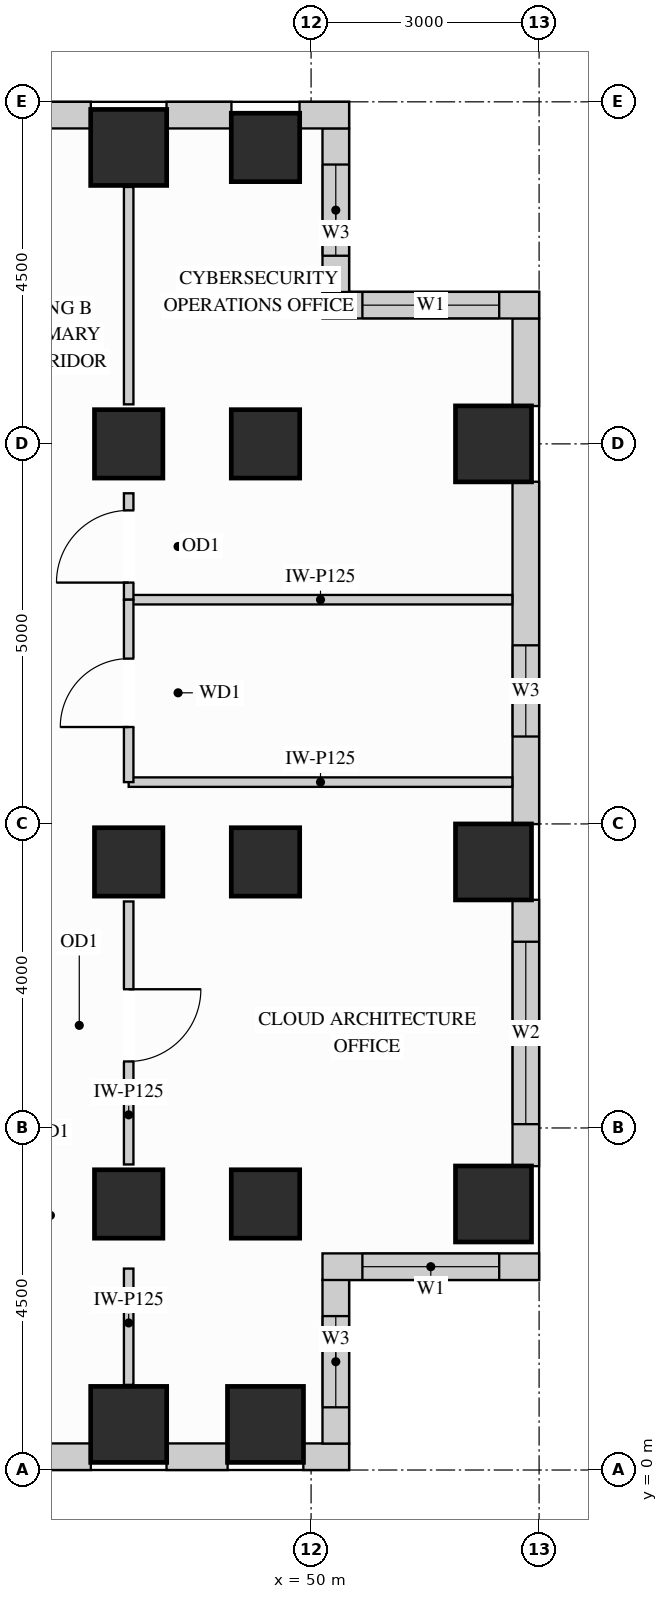
"""IFC4 building model, lengths in metres.
Left out: names, types, materials, properties, quantities, classifications, styles, units other than length and angle.
Written with IfcOpenShell. Run it as: python <this file> out.ifc"""

import sys

from ifc_helpers import new_model, si_unit, direction, frame, frame_2d, origin, origin_2d, place, context, subcontext, project, spatial, rectangle, extrude, source, transform, mapped, element, fill, save


model = new_model("IFC4")
c1 = context("Model", 3, precision=1e-05, world=origin(), true_north=direction((0.0, 1.0)))
c2 = subcontext(c1, "Body", "Model", "MODEL_VIEW")
j1 = project(units=[si_unit("LENGTHUNIT", "METRE"), si_unit("PLANEANGLEUNIT", "RADIAN")], contexts=[c1])
p1 = place(None, origin())
s1 = spatial("IfcSite", under=j1, at=p1, CompositionType="ELEMENT")
p2 = place(p1, origin())
s2 = spatial("IfcBuilding", under=s1, at=p2, CompositionType="ELEMENT")
p3 = place(p2, frame((0.0, 0.0, 193.5)))
s3 = spatial("IfcBuildingStorey", under=s2, at=p3, CompositionType="ELEMENT", Elevation=193.5)
m1 = source(origin(), c2, "Body", "SweptSolid", [
    extrude(rectangle(XDim=0.9, YDim=0.9, at=origin_2d()), origin(), (0.0, 0.0, 1.0), 3.4),
])
for number, where, z_axis, x_axis in (
    (1, (47.6, 13.5, 0.0), (0.0, 0.0, 1.0), (1.0, 0.0, 0.0)),
    (2, (47.6, 3.5, 0.0), (0.0, 0.0, 1.0), (1.0, 0.0, 0.0)),
    (3, (47.6, 8.0, 0.0), (0.0, 0.0, 1.0), (1.0, 0.0, 0.0)),
    (4, (49.4, 13.5, 0.0), (0.0, 0.0, 1.0), (1.0, 0.0, 0.0)),
    (5, (49.4, 17.4, 0.0), (0.0, 0.0, 1.0), (1.0, 0.0, 0.0)),
    (6, (49.4, 3.5, 0.0), (0.0, 0.0, 1.0), (1.0, 0.0, 0.0)),
    (7, (49.4, 8.0, 0.0), (0.0, 0.0, 1.0), (1.0, 0.0, 0.0)),
):
    element("IfcColumn", number, at=place(p3, frame(where, z_axis=z_axis, x_axis=x_axis)), inside=s3, PredefinedType="COLUMN", context=c2, shape_type="MappedRepresentation", body=[
        mapped(m1, transform((0.0, 0.0, 0.0), x_axis=(1.0, 0.0, 0.0), y_axis=(0.0, 1.0, 0.0), z_axis=(0.0, 0.0, 1.0))),
    ])
m2 = source(origin(), c2, "Body", "SweptSolid", [
    extrude(rectangle(XDim=1.0, YDim=1.0, at=origin_2d()), origin(), (0.0, 0.0, 1.0), 3.4),
])
for number, where, z_axis, x_axis in (
    (8, (47.6, 17.4, 0.0), (0.0, 0.0, 1.0), (1.0, 0.0, 0.0)),
    (9, (52.4, 13.5, 0.0), (0.0, 0.0, 1.0), (1.0, 0.0, 0.0)),
    (10, (52.4, 3.5, 0.0), (0.0, 0.0, 1.0), (1.0, 0.0, 0.0)),
    (11, (52.4, 8.0, 0.0), (0.0, 0.0, 1.0), (1.0, 0.0, 0.0)),
    (12, (47.6, 0.6, 0.0), (0.0, 0.0, 1.0), (1.0, 0.0, 0.0)),
    (13, (49.4, 0.6, 0.0), (0.0, 0.0, 1.0), (1.0, 0.0, 0.0)),
):
    element("IfcColumn", number, at=place(p3, frame(where, z_axis=z_axis, x_axis=x_axis)), inside=s3, PredefinedType="COLUMN", context=c2, shape_type="MappedRepresentation", body=[
        mapped(m2, transform((0.0, 0.0, 0.0), x_axis=(1.0, 0.0, 0.0), y_axis=(0.0, 1.0, 0.0), z_axis=(0.0, 0.0, 1.0))),
    ])
p4 = place(p3, frame((40.498, 0.175, 0.0), z_axis=(0.0, 0.0, 1.0), x_axis=(1.0, 0.0, 0.0)))
e14 = element("IfcWall", 14, at=p4, inside=s3, PredefinedType="SOLIDWALL", context=c2, shape_type="SweptSolid", body=[
    extrude(rectangle(XDim=6.604, YDim=0.35, at=frame_2d((3.302, 0.0))), origin(), (0.0, 0.0, 1.0), 2.612),
])
p5 = place(p4, frame((0.737, 0.0, 0.78)))
e15 = element("IfcOpeningElement", 15, at=p5, cuts=e14, PredefinedType="OPENING", context=c2, shape_type="SweptSolid", body=[
    extrude(rectangle(XDim=1.8, YDim=1.652, at=frame_2d((0.9, 0.826))), frame((0.0, 0.185, 0.0), z_axis=(0.0, -1.0, 0.0), x_axis=(1.0, 0.0, 0.0)), (0.0, 0.0, 1.0), 0.37),
])
p6 = place(p4, frame((2.955, 0.0, 0.78)))
e16 = element("IfcOpeningElement", 16, at=p6, cuts=e14, PredefinedType="OPENING", context=c2, shape_type="SweptSolid", body=[
    extrude(rectangle(XDim=1.8, YDim=1.652, at=frame_2d((0.9, 0.826))), frame((0.0, 0.185, 0.0), z_axis=(0.0, -1.0, 0.0), x_axis=(1.0, 0.0, 0.0)), (0.0, 0.0, 1.0), 0.37),
])
m3 = source(origin(), c2, "Body", "SweptSolid", [
    extrude(rectangle(XDim=0.804, YDim=0.35, at=frame_2d((0.402, 0.0))), origin(), (0.0, 0.0, 1.0), 3.385),
])
p7 = place(p3, frame((48.098, 0.175, 0.0), z_axis=(0.0, 0.0, 1.0), x_axis=(1.0, 0.0, 0.0)))
e17 = element("IfcWall", 17, at=p7, inside=s3, PredefinedType="SOLIDWALL", context=c2, shape_type="MappedRepresentation", body=[
    mapped(m3, transform((0.0, 0.0, 0.0), x_axis=(1.0, 0.0, 0.0), y_axis=(0.0, 1.0, 0.0), z_axis=(0.0, 0.0, 1.0))),
])
m4 = source(origin(), c2, "Body", "SweptSolid", [
    extrude(rectangle(XDim=0.602, YDim=0.35, at=frame_2d((0.301, 0.0))), origin(), (0.0, 0.0, 1.0), 3.385),
])
p8 = place(p3, frame((49.898, 0.175, 0.0), z_axis=(0.0, 0.0, 1.0), x_axis=(1.0, 0.0, 0.0)))
e18 = element("IfcWall", 18, at=p8, inside=s3, PredefinedType="SOLIDWALL", context=c2, shape_type="MappedRepresentation", body=[
    mapped(m4, transform((0.0, 0.0, 0.0), x_axis=(1.0, 0.0, 0.0), y_axis=(0.0, 1.0, 0.0), z_axis=(0.0, 0.0, 1.0))),
])
p9 = place(p3, frame((50.325, 0.348, 0.0), z_axis=(0.0, 0.0, 1.0), x_axis=(0.0, 1.0, 0.0)))
e19 = element("IfcWall", 19, at=p9, inside=s3, PredefinedType="SOLIDWALL", context=c2, shape_type="SweptSolid", body=[
    extrude(rectangle(XDim=2.154, YDim=0.35, at=frame_2d((1.077, 0.0))), origin(), (0.0, 0.0, 1.0), 3.385),
])
p10 = place(p9, frame((0.477, 0.0, 0.78)))
e20 = element("IfcOpeningElement", 20, at=p10, cuts=e19, PredefinedType="OPENING", context=c2, shape_type="SweptSolid", body=[
    extrude(rectangle(XDim=1.2, YDim=2.1, at=frame_2d((0.6, 1.05))), frame((0.0, 0.185, 0.0), z_axis=(0.0, -1.0, 0.0), x_axis=(1.0, 0.0, 0.0)), (0.0, 0.0, 1.0), 0.37),
])
p11 = place(p3, frame((50.15, 2.675, 0.0), z_axis=(0.0, 0.0, 1.0), x_axis=(1.0, 0.0, 0.0)))
e21 = element("IfcWall", 21, at=p11, inside=s3, PredefinedType="SOLIDWALL", context=c2, shape_type="SweptSolid", body=[
    extrude(rectangle(XDim=2.85, YDim=0.35, at=frame_2d((1.425, 0.0))), origin(), (0.0, 0.0, 1.0), 3.385),
])
p12 = place(p11, frame((0.525, 0.0, 0.78)))
e22 = element("IfcOpeningElement", 22, at=p12, cuts=e21, PredefinedType="OPENING", context=c2, shape_type="SweptSolid", body=[
    extrude(rectangle(XDim=1.8, YDim=2.1, at=frame_2d((0.9, 1.05))), frame((0.0, 0.185, 0.0), z_axis=(0.0, -1.0, 0.0), x_axis=(1.0, 0.0, 0.0)), (0.0, 0.0, 1.0), 0.37),
])
p13 = place(p3, frame((52.825, 3.998, 0.0), z_axis=(0.0, 0.0, 1.0), x_axis=(0.0, 1.0, 0.0)))
e23 = element("IfcWall", 23, at=p13, inside=s3, PredefinedType="SOLIDWALL", context=c2, shape_type="SweptSolid", body=[
    extrude(rectangle(XDim=3.504, YDim=0.35, at=frame_2d((1.752, 0.0))), origin(), (0.0, 0.0, 1.0), 2.612),
])
p14 = place(p13, frame((0.552, 0.0, 0.78)))
e24 = element("IfcOpeningElement", 24, at=p14, cuts=e23, PredefinedType="OPENING", context=c2, shape_type="SweptSolid", body=[
    extrude(rectangle(XDim=2.4, YDim=1.652, at=frame_2d((1.2, 0.826))), frame((0.0, 0.185, 0.0), z_axis=(0.0, -1.0, 0.0), x_axis=(1.0, 0.0, 0.0)), (0.0, 0.0, 1.0), 0.37),
])
p15 = place(p3, frame((52.825, 8.498, 0.0), z_axis=(0.0, 0.0, 1.0), x_axis=(0.0, 1.0, 0.0)))
e25 = element("IfcWall", 25, at=p15, inside=s3, PredefinedType="SOLIDWALL", context=c2, shape_type="SweptSolid", body=[
    extrude(rectangle(XDim=4.504, YDim=0.35, at=frame_2d((2.252, 0.0))), origin(), (0.0, 0.0, 1.0), 2.612),
])
p16 = place(p15, frame((1.152, 0.0, 0.78)))
e26 = element("IfcOpeningElement", 26, at=p16, cuts=e25, PredefinedType="OPENING", context=c2, shape_type="SweptSolid", body=[
    extrude(rectangle(XDim=1.2, YDim=1.652, at=frame_2d((0.6, 0.826))), frame((0.0, 0.185, 0.0), z_axis=(0.0, -1.0, 0.0), x_axis=(1.0, 0.0, 0.0)), (0.0, 0.0, 1.0), 0.37),
])
m5 = source(origin(), c2, "Body", "SweptSolid", [
    extrude(rectangle(XDim=1.154, YDim=0.35, at=frame_2d((0.577, 0.0))), origin(), (0.0, 0.0, 1.0), 3.385),
])
p17 = place(p3, frame((52.825, 13.998, 0.0), z_axis=(0.0, 0.0, 1.0), x_axis=(0.0, 1.0, 0.0)))
e27 = element("IfcWall", 27, at=p17, inside=s3, PredefinedType="SOLIDWALL", context=c2, shape_type="MappedRepresentation", body=[
    mapped(m5, transform((0.0, 0.0, 0.0), x_axis=(1.0, 0.0, 0.0), y_axis=(0.0, 1.0, 0.0), z_axis=(0.0, 0.0, 1.0))),
])
p18 = place(p3, frame((53.0, 15.325, 0.0), z_axis=(0.0, 0.0, 1.0), x_axis=(-1.0, 0.0, 0.0)))
e28 = element("IfcWall", 28, at=p18, inside=s3, PredefinedType="SOLIDWALL", context=c2, shape_type="SweptSolid", body=[
    extrude(rectangle(XDim=2.85, YDim=0.35, at=frame_2d((1.425, 0.0))), origin(), (0.0, 0.0, 1.0), 3.385),
])
p19 = place(p18, frame((0.525, 0.0, 0.78)))
e29 = element("IfcOpeningElement", 29, at=p19, cuts=e28, PredefinedType="OPENING", context=c2, shape_type="SweptSolid", body=[
    extrude(rectangle(XDim=1.8, YDim=2.1, at=frame_2d((0.9, 1.05))), frame((0.0, 0.185, 0.0), z_axis=(0.0, -1.0, 0.0), x_axis=(1.0, 0.0, 0.0)), (0.0, 0.0, 1.0), 0.37),
])
p20 = place(p3, frame((50.325, 15.498, 0.0), z_axis=(0.0, 0.0, 1.0), x_axis=(0.0, 1.0, 0.0)))
e30 = element("IfcWall", 30, at=p20, inside=s3, PredefinedType="SOLIDWALL", context=c2, shape_type="SweptSolid", body=[
    extrude(rectangle(XDim=2.154, YDim=0.35, at=frame_2d((1.077, 0.0))), origin(), (0.0, 0.0, 1.0), 3.385),
])
p21 = place(p20, frame((0.477, 0.0, 0.78)))
e31 = element("IfcOpeningElement", 31, at=p21, cuts=e30, PredefinedType="OPENING", context=c2, shape_type="SweptSolid", body=[
    extrude(rectangle(XDim=1.2, YDim=2.1, at=frame_2d((0.6, 1.05))), frame((0.0, 0.185, 0.0), z_axis=(0.0, -1.0, 0.0), x_axis=(1.0, 0.0, 0.0)), (0.0, 0.0, 1.0), 0.37),
])
m6 = source(origin(), c2, "Body", "SweptSolid", [
    extrude(rectangle(XDim=0.652, YDim=0.35, at=frame_2d((0.326, 0.0))), origin(), (0.0, 0.0, 1.0), 3.385),
])
p22 = place(p3, frame((50.5, 17.825, 0.0), z_axis=(0.0, 0.0, 1.0), x_axis=(-1.0, 0.0, 0.0)))
e32 = element("IfcWall", 32, at=p22, inside=s3, PredefinedType="SOLIDWALL", context=c2, shape_type="MappedRepresentation", body=[
    mapped(m6, transform((0.0, 0.0, 0.0), x_axis=(1.0, 0.0, 0.0), y_axis=(0.0, 1.0, 0.0), z_axis=(0.0, 0.0, 1.0))),
])
m7 = source(origin(), c2, "Body", "SweptSolid", [
    extrude(rectangle(XDim=0.854, YDim=0.35, at=frame_2d((0.427, 0.0))), origin(), (0.0, 0.0, 1.0), 3.385),
])
p23 = place(p3, frame((48.952, 17.825, 0.0), z_axis=(0.0, 0.0, 1.0), x_axis=(-1.0, 0.0, 0.0)))
e33 = element("IfcWall", 33, at=p23, inside=s3, PredefinedType="SOLIDWALL", context=c2, shape_type="MappedRepresentation", body=[
    mapped(m7, transform((0.0, 0.0, 0.0), x_axis=(1.0, 0.0, 0.0), y_axis=(0.0, 1.0, 0.0), z_axis=(0.0, 0.0, 1.0))),
])
p24 = place(p3, frame((47.102, 17.825, 0.0), z_axis=(0.0, 0.0, 1.0), x_axis=(-1.0, 0.0, 0.0)))
e34 = element("IfcWall", 34, at=p24, inside=s3, PredefinedType="SOLIDWALL", context=c2, shape_type="SweptSolid", body=[
    extrude(rectangle(XDim=6.604, YDim=0.35, at=frame_2d((3.302, 0.0))), origin(), (0.0, 0.0, 1.0), 2.612),
])
p25 = place(p24, frame((1.849, 0.0, 0.78)))
e35 = element("IfcOpeningElement", 35, at=p25, cuts=e34, PredefinedType="OPENING", context=c2, shape_type="SweptSolid", body=[
    extrude(rectangle(XDim=1.8, YDim=1.652, at=frame_2d((0.9, 0.826))), frame((0.0, 0.185, 0.0), z_axis=(0.0, -1.0, 0.0), x_axis=(1.0, 0.0, 0.0)), (0.0, 0.0, 1.0), 0.37),
])
p26 = place(p24, frame((4.067, 0.0, 0.78)))
e36 = element("IfcOpeningElement", 36, at=p26, cuts=e34, PredefinedType="OPENING", context=c2, shape_type="SweptSolid", body=[
    extrude(rectangle(XDim=1.8, YDim=1.652, at=frame_2d((0.9, 0.826))), frame((0.0, 0.185, 0.0), z_axis=(0.0, -1.0, 0.0), x_axis=(1.0, 0.0, 0.0)), (0.0, 0.0, 1.0), 0.37),
])
m8 = source(origin(), c2, "Body", "SweptSolid", [
    extrude(rectangle(XDim=5.048, YDim=0.125, at=frame_2d((2.524, 0.0))), origin(), (0.0, 0.0, 1.0), 3.385),
])
for number, where, z_axis, x_axis in (
    (37, (47.6, 11.45, 0.0), (0.0, 0.0, 1.0), (1.0, 0.0, 0.0)),
    (38, (47.6, 9.05, 0.0), (0.0, 0.0, 1.0), (1.0, 0.0, 0.0)),
):
    element("IfcWall", number, at=place(p3, frame(where, z_axis=z_axis, x_axis=x_axis)), inside=s3, PredefinedType="PARTITIONING", context=c2, shape_type="MappedRepresentation", body=[
        mapped(m8, transform((0.0, 0.0, 0.0), x_axis=(1.0, 0.0, 0.0), y_axis=(0.0, 1.0, 0.0), z_axis=(0.0, 0.0, 1.0))),
    ])
p27 = place(p3, frame((47.6, 4.02, 0.0), z_axis=(0.0, 0.0, 1.0), x_axis=(0.0, 1.0, 0.0)))
e39 = element("IfcWall", 39, at=p27, inside=s3, PredefinedType="PARTITIONING", context=c2, shape_type="SweptSolid", body=[
    extrude(rectangle(XDim=3.46, YDim=0.125, at=frame_2d((1.73, 0.0))), origin(), (0.0, 0.0, 1.0), 2.773),
])
p28 = place(p27, frame((1.355, 0.0, 0.0)))
e40 = element("IfcOpeningElement", 40, at=p28, cuts=e39, PredefinedType="OPENING", context=c2, shape_type="SweptSolid", body=[
    extrude(rectangle(XDim=0.95, YDim=2.15, at=frame_2d((0.475, 1.075))), frame((0.0, 0.073, 0.0), z_axis=(0.0, -1.0, 0.0), x_axis=(1.0, 0.0, 0.0)), (0.0, 0.0, 1.0), 0.145),
])
m9 = source(origin(), c2, "Body", "SweptSolid", [
    extrude(rectangle(XDim=1.53, YDim=0.125, at=frame_2d((0.765, 0.0))), origin(), (0.0, 0.0, 1.0), 2.773),
])
p29 = place(p3, frame((47.6, 1.12, 0.0), z_axis=(0.0, 0.0, 1.0), x_axis=(0.0, 1.0, 0.0)))
e41 = element("IfcWall", 41, at=p29, inside=s3, PredefinedType="PARTITIONING", context=c2, shape_type="MappedRepresentation", body=[
    mapped(m9, transform((0.0, 0.0, 0.0), x_axis=(1.0, 0.0, 0.0), y_axis=(0.0, 1.0, 0.0), z_axis=(0.0, 0.0, 1.0))),
])
p30 = place(p3, frame((47.6, 11.45, 0.0), z_axis=(0.0, 0.0, 1.0), x_axis=(0.0, 1.0, 0.0)))
e42 = element("IfcWall", 42, at=p30, inside=s3, PredefinedType="PARTITIONING", context=c2, shape_type="SweptSolid", body=[
    extrude(rectangle(XDim=1.4, YDim=0.125, at=frame_2d((0.7, 0.0))), origin(), (0.0, 0.0, 1.0), 2.773),
])
p31 = place(p30, frame((0.225, 0.0, 0.0)))
e43 = element("IfcOpeningElement", 43, at=p31, cuts=e42, PredefinedType="OPENING", context=c2, shape_type="SweptSolid", body=[
    extrude(rectangle(XDim=0.95, YDim=2.15, at=frame_2d((0.475, 1.075))), frame((0.0, 0.073, 0.0), z_axis=(0.0, -1.0, 0.0), x_axis=(1.0, 0.0, 0.0)), (0.0, 0.0, 1.0), 0.145),
])
m10 = source(origin(), c2, "Body", "SweptSolid", [
    extrude(rectangle(XDim=2.86, YDim=0.125, at=frame_2d((1.43, 0.0))), origin(), (0.0, 0.0, 1.0), 2.773),
])
p32 = place(p3, frame((47.6, 14.02, 0.0), z_axis=(0.0, 0.0, 1.0), x_axis=(0.0, 1.0, 0.0)))
e44 = element("IfcWall", 44, at=p32, inside=s3, PredefinedType="PARTITIONING", context=c2, shape_type="MappedRepresentation", body=[
    mapped(m10, transform((0.0, 0.0, 0.0), x_axis=(1.0, 0.0, 0.0), y_axis=(0.0, 1.0, 0.0), z_axis=(0.0, 0.0, 1.0))),
])
p33 = place(p3, frame((47.6, 9.05, 0.0), z_axis=(0.0, 0.0, 1.0), x_axis=(0.0, 1.0, 0.0)))
e45 = element("IfcWall", 45, at=p33, inside=s3, PredefinedType="PARTITIONING", context=c2, shape_type="SweptSolid", body=[
    extrude(rectangle(XDim=2.4, YDim=0.125, at=frame_2d((1.2, 0.0))), origin(), (0.0, 0.0, 1.0), 2.773),
])
p34 = place(p33, frame((0.725, 0.0, 0.0)))
e46 = element("IfcOpeningElement", 46, at=p34, cuts=e45, PredefinedType="OPENING", context=c2, shape_type="SweptSolid", body=[
    extrude(rectangle(XDim=0.9, YDim=2.15, at=frame_2d((0.45, 1.075))), frame((0.0, 0.073, 0.0), z_axis=(0.0, -1.0, 0.0), x_axis=(1.0, 0.0, 0.0)), (0.0, 0.0, 1.0), 0.145),
])
m11 = source(origin(), c2, "Body", "SweptSolid", [
    extrude(rectangle(XDim=0.95, YDim=2.15, at=frame_2d((0.475, 1.075))), frame((0.0, 0.025, 0.0), z_axis=(0.0, -1.0, 0.0), x_axis=(1.0, 0.0, 0.0)), (0.0, 0.0, 1.0), 0.05),
])
p35 = place(p28, origin())
e47 = element("IfcDoor", 47, at=p35, inside=s3, OperationType="SINGLE_SWING_RIGHT", PredefinedType="DOOR", context=c2, shape_type="MappedRepresentation", body=[
    mapped(m11, transform((0.0, 0.0, 0.0), x_axis=(1.0, 0.0, 0.0), y_axis=(0.0, 1.0, 0.0), z_axis=(0.0, 0.0, 1.0))),
])
fill(e40, e47)
p36 = place(p31, origin())
e48 = element("IfcDoor", 48, at=p36, inside=s3, OperationType="SINGLE_SWING_LEFT", PredefinedType="DOOR", context=c2, shape_type="MappedRepresentation", body=[
    mapped(m11, transform((0.0, 0.0, 0.0), x_axis=(1.0, 0.0, 0.0), y_axis=(0.0, 1.0, 0.0), z_axis=(0.0, 0.0, 1.0))),
])
fill(e43, e48)
m12 = source(origin(), c2, "Body", "SweptSolid", [
    extrude(rectangle(XDim=0.9, YDim=2.15, at=frame_2d((0.45, 1.075))), frame((0.0, 0.025, 0.0), z_axis=(0.0, -1.0, 0.0), x_axis=(1.0, 0.0, 0.0)), (0.0, 0.0, 1.0), 0.05),
])
p37 = place(p34, origin())
e49 = element("IfcDoor", 49, at=p37, inside=s3, OperationType="SINGLE_SWING_LEFT", PredefinedType="DOOR", context=c2, shape_type="MappedRepresentation", body=[
    mapped(m12, transform((0.0, 0.0, 0.0), x_axis=(1.0, 0.0, 0.0), y_axis=(0.0, 1.0, 0.0), z_axis=(0.0, 0.0, 1.0))),
])
fill(e46, e49)
m13 = source(origin(), c2, "Body", "SweptSolid", [
    extrude(rectangle(XDim=1.8, YDim=2.1, at=frame_2d((0.9, 1.05))), frame((0.0, 0.03, 0.0), z_axis=(0.0, -1.0, 0.0), x_axis=(1.0, 0.0, 0.0)), (0.0, 0.0, 1.0), 0.06),
])
p38 = place(p12, origin())
e50 = element("IfcWindow", 50, at=p38, inside=s3, PartitioningType="SINGLE_PANEL", PredefinedType="WINDOW", context=c2, shape_type="MappedRepresentation", body=[
    mapped(m13, transform((0.0, 0.0, 0.0), x_axis=(1.0, 0.0, 0.0), y_axis=(0.0, 1.0, 0.0), z_axis=(0.0, 0.0, 1.0))),
])
fill(e22, e50)
p39 = place(p19, origin())
e51 = element("IfcWindow", 51, at=p39, inside=s3, PartitioningType="SINGLE_PANEL", PredefinedType="WINDOW", context=c2, shape_type="MappedRepresentation", body=[
    mapped(m13, transform((0.0, 0.0, 0.0), x_axis=(1.0, 0.0, 0.0), y_axis=(0.0, 1.0, 0.0), z_axis=(0.0, 0.0, 1.0))),
])
fill(e29, e51)
m14 = source(origin(), c2, "Body", "SweptSolid", [
    extrude(rectangle(XDim=2.4, YDim=1.652, at=frame_2d((1.2, 0.826))), frame((0.0, 0.03, 0.0), z_axis=(0.0, -1.0, 0.0), x_axis=(1.0, 0.0, 0.0)), (0.0, 0.0, 1.0), 0.06),
])
p40 = place(p14, origin())
e52 = element("IfcWindow", 52, at=p40, inside=s3, PartitioningType="SINGLE_PANEL", PredefinedType="WINDOW", context=c2, shape_type="MappedRepresentation", body=[
    mapped(m14, transform((0.0, 0.0, 0.0), x_axis=(1.0, 0.0, 0.0), y_axis=(0.0, 1.0, 0.0), z_axis=(0.0, 0.0, 1.0))),
])
fill(e24, e52)
m15 = source(origin(), c2, "Body", "SweptSolid", [
    extrude(rectangle(XDim=1.2, YDim=2.1, at=frame_2d((0.6, 1.05))), frame((0.0, 0.03, 0.0), z_axis=(0.0, -1.0, 0.0), x_axis=(1.0, 0.0, 0.0)), (0.0, 0.0, 1.0), 0.06),
])
p41 = place(p10, origin())
e53 = element("IfcWindow", 53, at=p41, inside=s3, PartitioningType="SINGLE_PANEL", PredefinedType="WINDOW", context=c2, shape_type="MappedRepresentation", body=[
    mapped(m15, transform((0.0, 0.0, 0.0), x_axis=(1.0, 0.0, 0.0), y_axis=(0.0, 1.0, 0.0), z_axis=(0.0, 0.0, 1.0))),
])
fill(e20, e53)
m16 = source(origin(), c2, "Body", "SweptSolid", [
    extrude(rectangle(XDim=1.2, YDim=1.652, at=frame_2d((0.6, 0.826))), frame((0.0, 0.03, 0.0), z_axis=(0.0, -1.0, 0.0), x_axis=(1.0, 0.0, 0.0)), (0.0, 0.0, 1.0), 0.06),
])
p42 = place(p16, origin())
e54 = element("IfcWindow", 54, at=p42, inside=s3, PartitioningType="SINGLE_PANEL", PredefinedType="WINDOW", context=c2, shape_type="MappedRepresentation", body=[
    mapped(m16, transform((0.0, 0.0, 0.0), x_axis=(1.0, 0.0, 0.0), y_axis=(0.0, 1.0, 0.0), z_axis=(0.0, 0.0, 1.0))),
])
fill(e26, e54)
p43 = place(p21, origin())
e55 = element("IfcWindow", 55, at=p43, inside=s3, PartitioningType="SINGLE_PANEL", PredefinedType="WINDOW", context=c2, shape_type="MappedRepresentation", body=[
    mapped(m15, transform((0.0, 0.0, 0.0), x_axis=(1.0, 0.0, 0.0), y_axis=(0.0, 1.0, 0.0), z_axis=(0.0, 0.0, 1.0))),
])
fill(e31, e55)
save(model, sys.argv[1])
